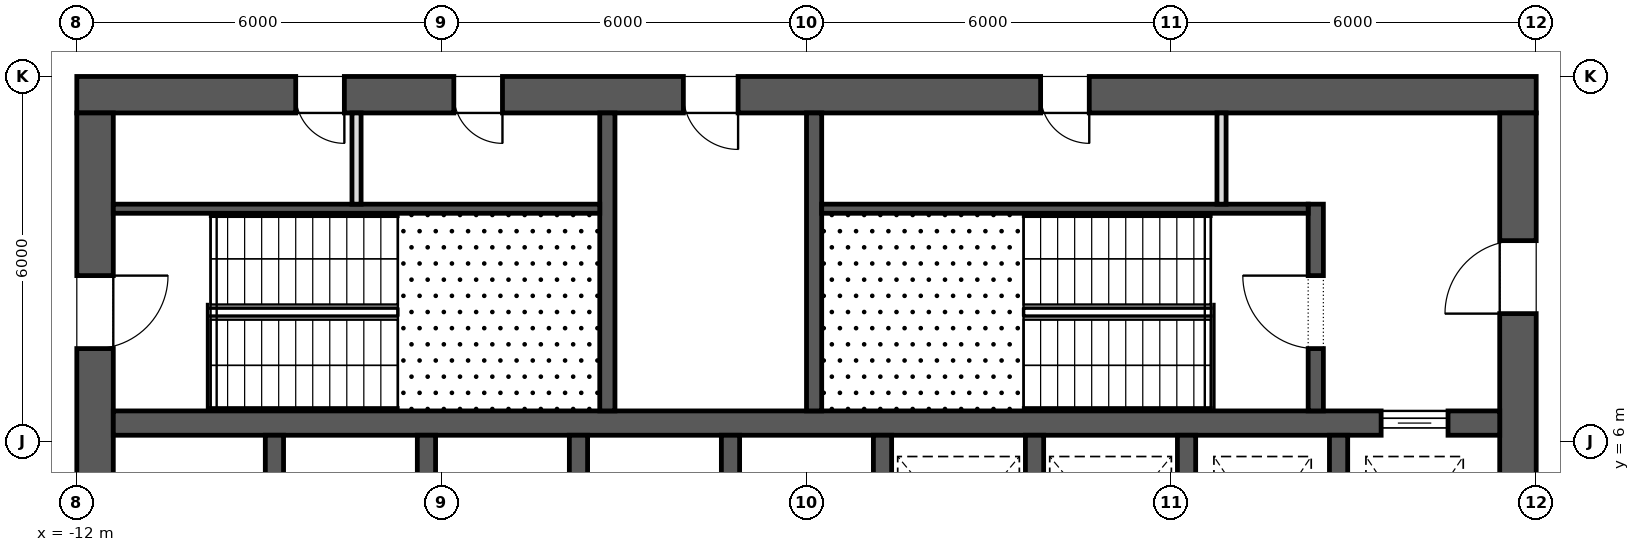
"""IFC4 building model, lengths in metres.
Left out: names, types, materials, properties, quantities, classifications, styles, units other than length and angle.
Written with IfcOpenShell. Run it as: python <this file> out.ifc"""

import sys

from ifc_helpers import new_model, si_unit, direction, frame, frame_2d, origin, place, context, subcontext, project, spatial, rectangle, extrude, element, fill, save


model = new_model("IFC4")
c1 = context("Model", 3, precision=1e-05, world=origin(), true_north=direction((0.0, 1.0)))
c2 = subcontext(c1, "Body", "Model", "MODEL_VIEW")
j1 = project(units=[si_unit("LENGTHUNIT", "METRE"), si_unit("PLANEANGLEUNIT", "RADIAN")], contexts=[c1])
p1 = place(None, origin())
s1 = spatial("IfcSite", under=j1, at=p1, CompositionType="ELEMENT")
p2 = place(p1, origin())
s2 = spatial("IfcBuilding", under=s1, at=p2, CompositionType="ELEMENT")
p3 = place(p2, frame((0.0, 0.0, 129.7)))
s3 = spatial("IfcBuildingStorey", under=s2, at=p3, CompositionType="ELEMENT", Elevation=129.7)
p4 = place(p3, frame((-12.0, 11.7, 0.0), z_axis=(0.0, 0.0, 1.0), x_axis=(1.0, 0.0, 0.0)))
e1 = element("IfcWall", 1, at=p4, inside=s3, PredefinedType="SHEAR", context=c2, shape_type="SweptSolid", body=[
    extrude(rectangle(XDim=24.0, YDim=0.6, at=frame_2d((12.0, 0.0))), origin(), (0.0, 0.0, 1.0), 4.2),
])
p5 = place(p4, frame((9.975, 0.0, 0.0)))
e2 = element("IfcOpeningElement", 2, at=p5, cuts=e1, PredefinedType="OPENING", context=c2, shape_type="SweptSolid", body=[
    extrude(rectangle(XDim=0.9, YDim=2.1, at=frame_2d((0.45, 1.05))), frame((0.0, 0.312, 0.0), z_axis=(0.0, -1.0, 0.0), x_axis=(1.0, 0.0, 0.0)), (0.0, 0.0, 1.0), 0.624),
])
p6 = place(p4, frame((3.6, 0.0, 0.0)))
e3 = element("IfcOpeningElement", 3, at=p6, cuts=e1, PredefinedType="OPENING", context=c2, shape_type="SweptSolid", body=[
    extrude(rectangle(XDim=0.8, YDim=2.1, at=frame_2d((0.4, 1.05))), frame((0.0, 0.312, 0.0), z_axis=(0.0, -1.0, 0.0), x_axis=(1.0, 0.0, 0.0)), (0.0, 0.0, 1.0), 0.624),
])
p7 = place(p4, frame((6.2, 0.0, 0.0)))
e4 = element("IfcOpeningElement", 4, at=p7, cuts=e1, PredefinedType="OPENING", context=c2, shape_type="SweptSolid", body=[
    extrude(rectangle(XDim=0.8, YDim=2.1, at=frame_2d((0.4, 1.05))), frame((0.0, 0.312, 0.0), z_axis=(0.0, -1.0, 0.0), x_axis=(1.0, 0.0, 0.0)), (0.0, 0.0, 1.0), 0.624),
])
p8 = place(p4, frame((15.85, 0.0, 0.0)))
e5 = element("IfcOpeningElement", 5, at=p8, cuts=e1, PredefinedType="OPENING", context=c2, shape_type="SweptSolid", body=[
    extrude(rectangle(XDim=0.8, YDim=2.1, at=frame_2d((0.4, 1.05))), frame((0.0, 0.312, 0.0), z_axis=(0.0, -1.0, 0.0), x_axis=(1.0, 0.0, 0.0)), (0.0, 0.0, 1.0), 0.624),
])
p9 = place(p3, frame((11.7, -11.4, 0.0), z_axis=(0.0, 0.0, 1.0), x_axis=(0.0, 1.0, 0.0)))
e6 = element("IfcWall", 6, at=p9, inside=s3, PredefinedType="SHEAR", context=c2, shape_type="SweptSolid", body=[
    extrude(rectangle(XDim=22.8, YDim=0.6, at=frame_2d((11.4, 0.0))), origin(), (0.0, 0.0, 1.0), 4.2),
])
p10 = place(p9, frame((10.2, 0.0, 0.0)))
e7 = element("IfcOpeningElement", 7, at=p10, cuts=e6, PredefinedType="OPENING", context=c2, shape_type="SweptSolid", body=[
    extrude(rectangle(XDim=2.4, YDim=2.1, at=frame_2d((1.2, 1.05))), frame((0.0, 0.312, 0.0), z_axis=(0.0, -1.0, 0.0), x_axis=(1.0, 0.0, 0.0)), (0.0, 0.0, 1.0), 0.624),
])
p11 = place(p9, frame((19.5, 0.0, 0.0)))
e8 = element("IfcOpeningElement", 8, at=p11, cuts=e6, PredefinedType="OPENING", context=c2, shape_type="SweptSolid", body=[
    extrude(rectangle(XDim=1.2, YDim=2.1, at=frame_2d((0.6, 1.05))), frame((0.0, 0.312, 0.0), z_axis=(0.0, -1.0, 0.0), x_axis=(1.0, 0.0, 0.0)), (0.0, 0.0, 1.0), 0.624),
])
p12 = place(p9, frame((2.1, 0.0, 0.0)))
e9 = element("IfcOpeningElement", 9, at=p12, cuts=e6, PredefinedType="OPENING", context=c2, shape_type="SweptSolid", body=[
    extrude(rectangle(XDim=1.2, YDim=2.1, at=frame_2d((0.6, 1.05))), frame((0.0, 0.312, 0.0), z_axis=(0.0, -1.0, 0.0), x_axis=(1.0, 0.0, 0.0)), (0.0, 0.0, 1.0), 0.624),
])
p13 = place(p3, frame((-11.7, -11.4, 0.0), z_axis=(0.0, 0.0, 1.0), x_axis=(0.0, 1.0, 0.0)))
e10 = element("IfcWall", 10, at=p13, inside=s3, PredefinedType="SHEAR", context=c2, shape_type="SweptSolid", body=[
    extrude(rectangle(XDim=22.8, YDim=0.6, at=frame_2d((11.4, 0.0))), origin(), (0.0, 0.0, 1.0), 4.2),
])
p14 = place(p13, frame((10.2, 0.0, 0.0)))
e11 = element("IfcOpeningElement", 11, at=p14, cuts=e10, PredefinedType="OPENING", context=c2, shape_type="SweptSolid", body=[
    extrude(rectangle(XDim=2.4, YDim=2.1, at=frame_2d((1.2, 1.05))), frame((0.0, 0.312, 0.0), z_axis=(0.0, -1.0, 0.0), x_axis=(1.0, 0.0, 0.0)), (0.0, 0.0, 1.0), 0.624),
])
p15 = place(p13, frame((18.925, 0.0, 0.0)))
e12 = element("IfcOpeningElement", 12, at=p15, cuts=e10, PredefinedType="OPENING", context=c2, shape_type="SweptSolid", body=[
    extrude(rectangle(XDim=1.2, YDim=2.1, at=frame_2d((0.6, 1.05))), frame((0.0, 0.312, 0.0), z_axis=(0.0, -1.0, 0.0), x_axis=(1.0, 0.0, 0.0)), (0.0, 0.0, 1.0), 0.624),
])
p16 = place(p13, frame((2.675, 0.0, 0.0)))
e13 = element("IfcOpeningElement", 13, at=p16, cuts=e10, PredefinedType="OPENING", context=c2, shape_type="SweptSolid", body=[
    extrude(rectangle(XDim=1.2, YDim=2.1, at=frame_2d((0.6, 1.05))), frame((0.0, 0.312, 0.0), z_axis=(0.0, -1.0, 0.0), x_axis=(1.0, 0.0, 0.0)), (0.0, 0.0, 1.0), 0.624),
])
p17 = place(p3, frame((-11.4, 6.3, 0.0), z_axis=(0.0, 0.0, 1.0), x_axis=(1.0, 0.0, 0.0)))
e14 = element("IfcWall", 14, at=p17, inside=s3, PredefinedType="SHEAR", context=c2, shape_type="SweptSolid", body=[
    extrude(rectangle(XDim=22.8, YDim=0.4, at=frame_2d((11.4, 0.0))), origin(), (0.0, 0.0, 1.0), 4.2),
])
p18 = place(p17, frame((20.85, 0.0, 0.0)))
e15 = element("IfcOpeningElement", 15, at=p18, cuts=e14, PredefinedType="OPENING", context=c2, shape_type="SweptSolid", body=[
    extrude(rectangle(XDim=1.1, YDim=2.1, at=frame_2d((0.55, 1.05))), frame((0.0, 0.212, 0.0), z_axis=(0.0, -1.0, 0.0), x_axis=(1.0, 0.0, 0.0)), (0.0, 0.0, 1.0), 0.424),
])
for number, where, z_axis, x_axis in (
    (16, (-8.75, 3.2, 0.0), (0.0, 0.0, 1.0), (0.0, 1.0, 0.0)),
    (17, (-6.25, 3.2, 0.0), (0.0, 0.0, 1.0), (0.0, 1.0, 0.0)),
    (18, (-3.75, 3.2, 0.0), (0.0, 0.0, 1.0), (0.0, 1.0, 0.0)),
    (19, (-1.25, 3.2, 0.0), (0.0, 0.0, 1.0), (0.0, 1.0, 0.0)),
    (20, (1.25, 3.2, 0.0), (0.0, 0.0, 1.0), (0.0, 1.0, 0.0)),
    (21, (3.75, 3.2, 0.0), (0.0, 0.0, 1.0), (0.0, 1.0, 0.0)),
    (22, (6.25, 3.2, 0.0), (0.0, 0.0, 1.0), (0.0, 1.0, 0.0)),
    (23, (8.75, 3.2, 0.0), (0.0, 0.0, 1.0), (0.0, 1.0, 0.0)),
):
    element("IfcWall", number, at=place(p3, frame(where, z_axis=z_axis, x_axis=x_axis)), inside=s3, PredefinedType="SHEAR", context=c2, shape_type="SweptSolid", body=[
        extrude(rectangle(XDim=2.9, YDim=0.3, at=frame_2d((1.45, 0.0))), origin(), (0.0, 0.0, 1.0), 4.2),
    ])
for number, where, z_axis, x_axis in (
    (24, (-3.275, 6.5, 0.0), (0.0, 0.0, 1.0), (0.0, 1.0, 0.0)),
    (25, (0.125, 6.5, 0.0), (0.0, 0.0, 1.0), (0.0, 1.0, 0.0)),
):
    element("IfcWall", number, at=place(p3, frame(where, z_axis=z_axis, x_axis=x_axis)), inside=s3, PredefinedType="SHEAR", context=c2, shape_type="SweptSolid", body=[
        extrude(rectangle(XDim=4.9, YDim=0.25, at=frame_2d((2.45, 0.0))), origin(), (0.0, 0.0, 1.0), 3.9),
    ])
p19 = place(p3, frame((8.375, 6.5, 0.0), z_axis=(0.0, 0.0, 1.0), x_axis=(0.0, 1.0, 0.0)))
e26 = element("IfcWall", 26, at=p19, inside=s3, PredefinedType="SHEAR", context=c2, shape_type="SweptSolid", body=[
    extrude(rectangle(XDim=3.4, YDim=0.25, at=frame_2d((1.7, 0.0))), origin(), (0.0, 0.0, 1.0), 3.9),
])
p20 = place(p19, frame((1.025, 0.0, 0.0)))
e27 = element("IfcOpeningElement", 27, at=p20, cuts=e26, PredefinedType="OPENING", context=c2, shape_type="SweptSolid", body=[
    extrude(rectangle(XDim=1.2, YDim=2.1, at=frame_2d((0.6, 1.05))), frame((0.0, 0.137, 0.0), z_axis=(0.0, -1.0, 0.0), x_axis=(1.0, 0.0, 0.0)), (0.0, 0.0, 1.0), 0.274),
])
for number, where, z_axis, x_axis in (
    (28, (-11.4, 9.825, 0.0), (0.0, 0.0, 1.0), (1.0, 0.0, 0.0)),
    (29, (0.25, 9.825, 0.0), (0.0, 0.0, 1.0), (1.0, 0.0, 0.0)),
):
    element("IfcWall", number, at=place(p3, frame(where, z_axis=z_axis, x_axis=x_axis)), inside=s3, PredefinedType="SHEAR", context=c2, shape_type="SweptSolid", body=[
        extrude(rectangle(XDim=8.0, YDim=0.15, at=frame_2d((4.0, 0.0))), origin(), (0.0, 0.0, 1.0), 3.9),
    ])
for number, where, z_axis, x_axis in (
    (30, (-7.4, 9.9, 0.0), (0.0, 0.0, 1.0), (0.0, 1.0, 0.0)),
    (31, (6.825, 9.9, 0.0), (0.0, 0.0, 1.0), (0.0, 1.0, 0.0)),
):
    element("IfcWall", number, at=place(p3, frame(where, z_axis=z_axis, x_axis=x_axis)), inside=s3, PredefinedType="PARTITIONING", context=c2, shape_type="SweptSolid", body=[
        extrude(rectangle(XDim=1.5, YDim=0.15, at=frame_2d((0.75, 0.0))), origin(), (0.0, 0.0, 1.0), 3.9),
    ])
p21 = place(p18, origin())
e32 = element("IfcDoor", 32, at=p21, inside=s3, OperationType="SLIDING_TO_LEFT", PredefinedType="DOOR", context=c2, shape_type="SweptSolid", body=[
    extrude(rectangle(XDim=1.1, YDim=2.1, at=frame_2d((0.55, 1.05))), frame((0.0, 0.025, 0.0), z_axis=(0.0, -1.0, 0.0), x_axis=(1.0, 0.0, 0.0)), (0.0, 0.0, 1.0), 0.05),
])
fill(e15, e32)
p22 = place(p15, frame((1.2, 0.0, 0.0), z_axis=(0.0, 0.0, 1.0), x_axis=(-1.0, 0.0, 0.0)))
e33 = element("IfcDoor", 33, at=p22, inside=s3, OperationType="SINGLE_SWING_RIGHT", PredefinedType="DOOR", context=c2, shape_type="SweptSolid", body=[
    extrude(rectangle(XDim=1.2, YDim=2.1, at=frame_2d((0.6, 1.05))), frame((0.0, 0.025, 0.0), z_axis=(0.0, -1.0, 0.0), x_axis=(1.0, 0.0, 0.0)), (0.0, 0.0, 1.0), 0.05),
])
fill(e12, e33)
p23 = place(p20, origin())
e34 = element("IfcDoor", 34, at=p23, inside=s3, OperationType="SINGLE_SWING_LEFT", PredefinedType="DOOR", context=c2, shape_type="SweptSolid", body=[
    extrude(rectangle(XDim=1.2, YDim=2.1, at=frame_2d((0.6, 1.05))), frame((0.0, 0.025, 0.0), z_axis=(0.0, -1.0, 0.0), x_axis=(1.0, 0.0, 0.0)), (0.0, 0.0, 1.0), 0.05),
])
fill(e27, e34)
p24 = place(p11, origin())
e35 = element("IfcDoor", 35, at=p24, inside=s3, OperationType="SINGLE_SWING_RIGHT", PredefinedType="DOOR", context=c2, shape_type="SweptSolid", body=[
    extrude(rectangle(XDim=1.2, YDim=2.1, at=frame_2d((0.6, 1.05))), frame((0.0, 0.025, 0.0), z_axis=(0.0, -1.0, 0.0), x_axis=(1.0, 0.0, 0.0)), (0.0, 0.0, 1.0), 0.05),
])
fill(e8, e35)
p25 = place(p5, frame((0.9, 0.0, 0.0), z_axis=(0.0, 0.0, 1.0), x_axis=(-1.0, 0.0, 0.0)))
e36 = element("IfcDoor", 36, at=p25, inside=s3, OperationType="SINGLE_SWING_RIGHT", PredefinedType="DOOR", context=c2, shape_type="SweptSolid", body=[
    extrude(rectangle(XDim=0.9, YDim=2.1, at=frame_2d((0.45, 1.05))), frame((0.0, 0.025, 0.0), z_axis=(0.0, -1.0, 0.0), x_axis=(1.0, 0.0, 0.0)), (0.0, 0.0, 1.0), 0.05),
])
fill(e2, e36)
p26 = place(p6, frame((0.8, 0.0, 0.0), z_axis=(0.0, 0.0, 1.0), x_axis=(-1.0, 0.0, 0.0)))
e37 = element("IfcDoor", 37, at=p26, inside=s3, OperationType="SINGLE_SWING_RIGHT", PredefinedType="DOOR", context=c2, shape_type="SweptSolid", body=[
    extrude(rectangle(XDim=0.8, YDim=2.1, at=frame_2d((0.4, 1.05))), frame((0.0, 0.025, 0.0), z_axis=(0.0, -1.0, 0.0), x_axis=(1.0, 0.0, 0.0)), (0.0, 0.0, 1.0), 0.05),
])
fill(e3, e37)
p27 = place(p7, frame((0.8, 0.0, 0.0), z_axis=(0.0, 0.0, 1.0), x_axis=(-1.0, 0.0, 0.0)))
e38 = element("IfcDoor", 38, at=p27, inside=s3, OperationType="SINGLE_SWING_RIGHT", PredefinedType="DOOR", context=c2, shape_type="SweptSolid", body=[
    extrude(rectangle(XDim=0.8, YDim=2.1, at=frame_2d((0.4, 1.05))), frame((0.0, 0.025, 0.0), z_axis=(0.0, -1.0, 0.0), x_axis=(1.0, 0.0, 0.0)), (0.0, 0.0, 1.0), 0.05),
])
fill(e4, e38)
p28 = place(p8, frame((0.8, 0.0, 0.0), z_axis=(0.0, 0.0, 1.0), x_axis=(-1.0, 0.0, 0.0)))
e39 = element("IfcDoor", 39, at=p28, inside=s3, OperationType="SINGLE_SWING_RIGHT", PredefinedType="DOOR", context=c2, shape_type="SweptSolid", body=[
    extrude(rectangle(XDim=0.8, YDim=2.1, at=frame_2d((0.4, 1.05))), frame((0.0, 0.025, 0.0), z_axis=(0.0, -1.0, 0.0), x_axis=(1.0, 0.0, 0.0)), (0.0, 0.0, 1.0), 0.05),
])
fill(e5, e39)
save(model, sys.argv[1])
